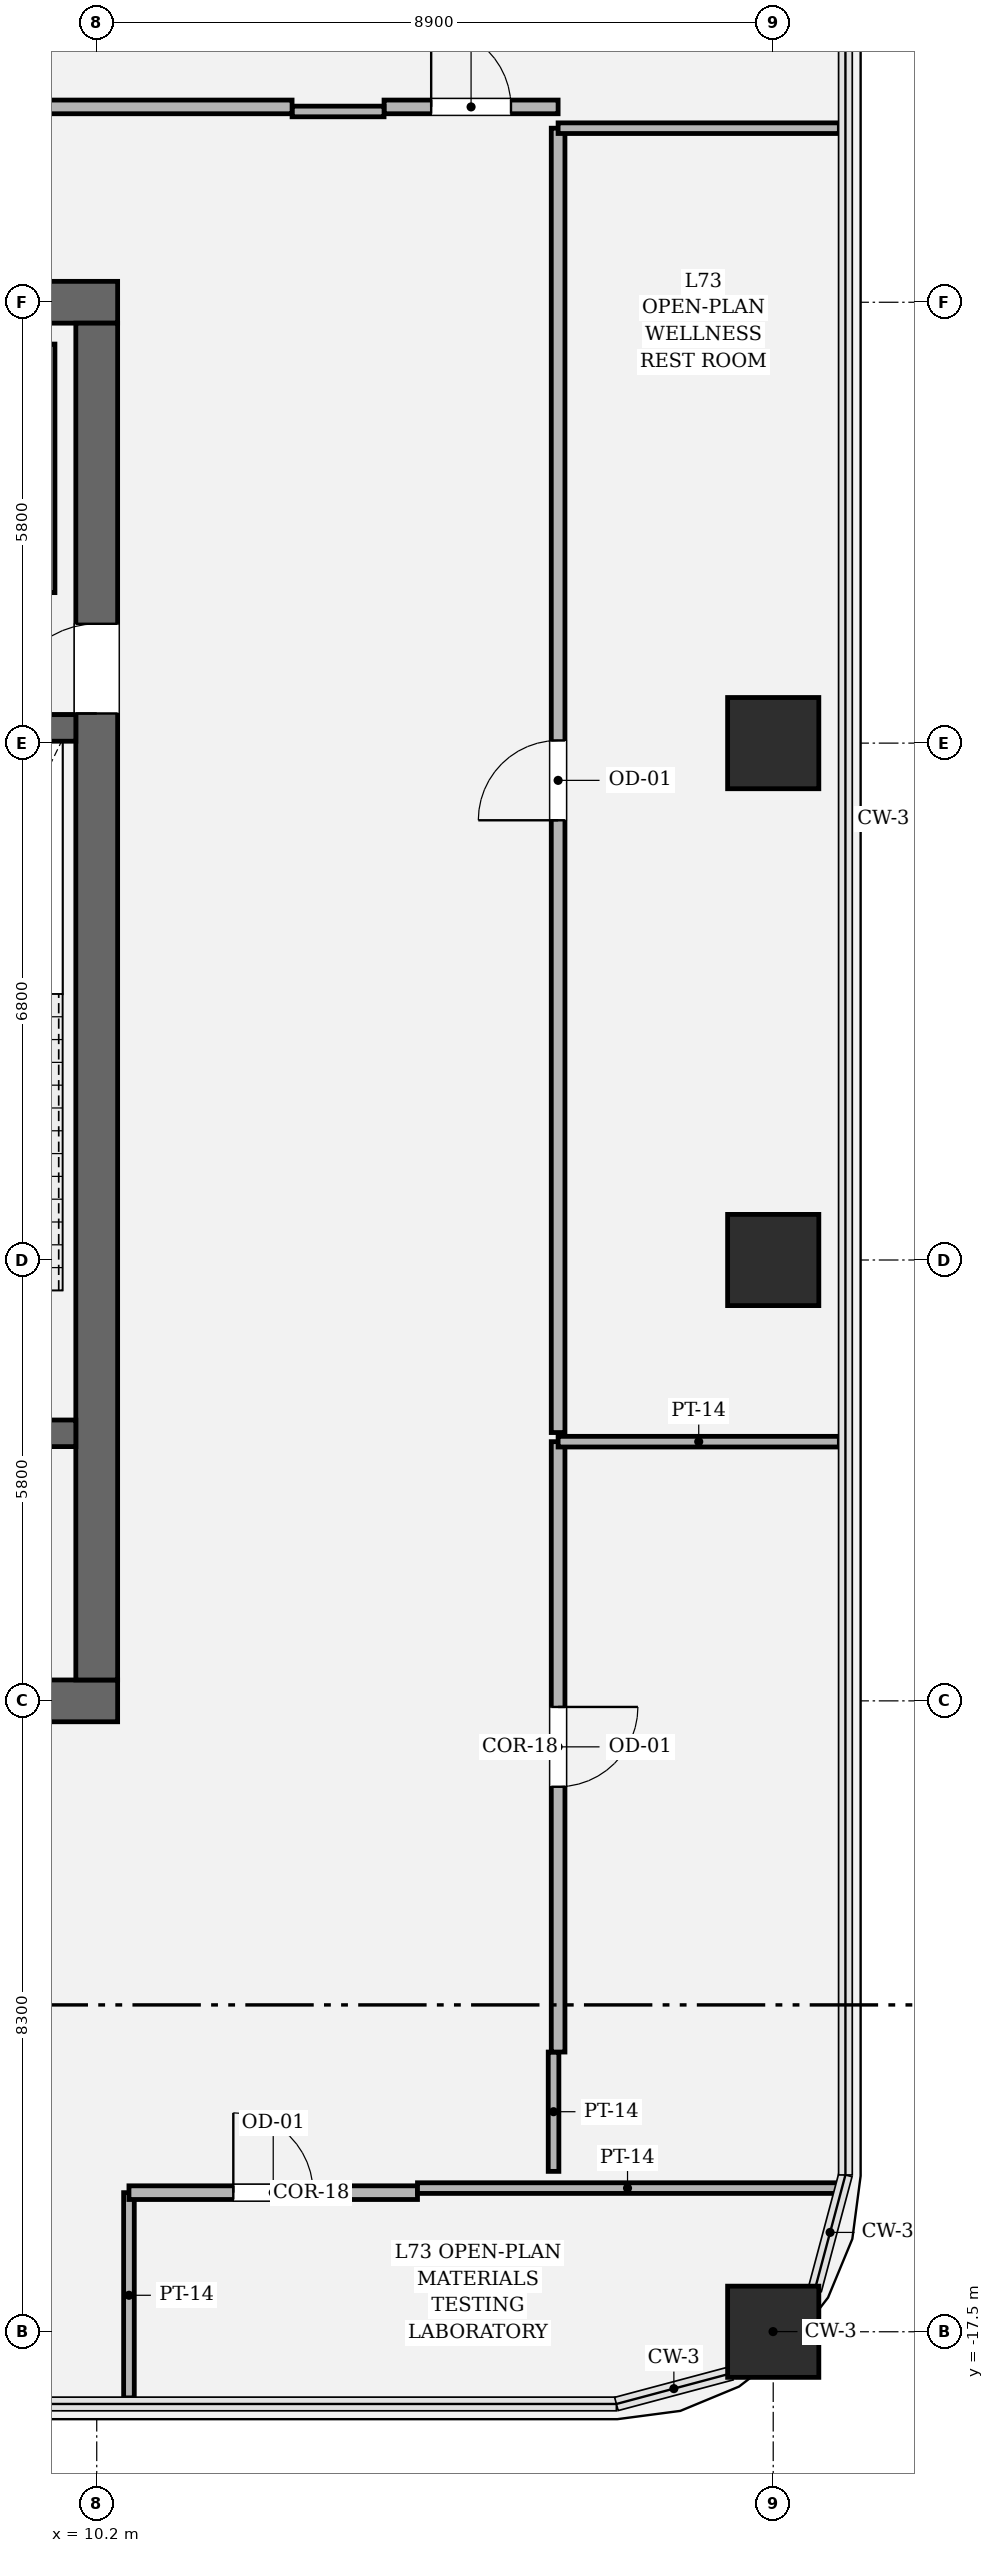
"""IFC4 building model, lengths in metres.
Left out: names, types, materials, properties, quantities, classifications, styles, units other than length and angle.
Written with IfcOpenShell. Run it as: python <this file> out.ifc"""

import sys

from ifc_helpers import new_model, si_unit, direction, frame, frame_2d, origin, origin_2d, place, context, subcontext, project, spatial, rectangle, hollow_rectangle, extrude, element, fill, save


model = new_model("IFC4")
c1 = context("Model", 3, precision=1e-05, world=origin(), true_north=direction((0.0, 1.0)))
c2 = subcontext(c1, "Body", "Model", "MODEL_VIEW")
j1 = project(units=[si_unit("LENGTHUNIT", "METRE"), si_unit("PLANEANGLEUNIT", "RADIAN")], contexts=[c1])
p1 = place(None, origin())
s1 = spatial("IfcSite", under=j1, at=p1, CompositionType="ELEMENT")
p2 = place(p1, origin())
s2 = spatial("IfcBuilding", under=s1, at=p2, CompositionType="ELEMENT")
p3 = place(p2, frame((0.0, 0.0, 309.0)))
s3 = spatial("IfcBuildingStorey", under=s2, at=p3, CompositionType="ELEMENT", Elevation=309.0)
p4 = place(p3, frame((10.475, -9.2, 0.0), z_axis=(0.0, 0.0, 1.0), x_axis=(-1.0, 0.0, 0.0)))
e1 = element("IfcWall", 1, at=p4, inside=s3, PredefinedType="SHEAR", context=c2, shape_type="SweptSolid", body=[
    extrude(rectangle(XDim=20.95, YDim=0.55, at=frame_2d((10.475, 0.0))), origin(), (0.0, 0.0, 1.0), 4.2),
])
p5 = place(p4, frame((2.75, 0.0, 0.0)))
e2 = element("IfcOpeningElement", 2, at=p5, cuts=e1, PredefinedType="OPENING", context=c2, shape_type="SweptSolid", body=[
    extrude(rectangle(XDim=1.25, YDim=2.25, at=frame_2d((0.625, 1.125))), frame((0.0, 0.285, 0.0), z_axis=(0.0, -1.0, 0.0), x_axis=(1.0, 0.0, 0.0)), (0.0, 0.0, 1.0), 0.57),
])
p6 = place(p4, frame((16.95, 0.0, 0.0)))
e3 = element("IfcOpeningElement", 3, at=p6, cuts=e1, PredefinedType="OPENING", context=c2, shape_type="SweptSolid", body=[
    extrude(rectangle(XDim=1.25, YDim=2.25, at=frame_2d((0.625, 1.125))), frame((0.0, 0.285, 0.0), z_axis=(0.0, -1.0, 0.0), x_axis=(1.0, 0.0, 0.0)), (0.0, 0.0, 1.0), 0.57),
])
p7 = place(p3, frame((-10.475, 9.2, 0.0), z_axis=(0.0, 0.0, 1.0), x_axis=(1.0, 0.0, 0.0)))
e4 = element("IfcWall", 4, at=p7, inside=s3, PredefinedType="SHEAR", context=c2, shape_type="SweptSolid", body=[
    extrude(rectangle(XDim=20.95, YDim=0.55, at=frame_2d((10.475, 0.0))), origin(), (0.0, 0.0, 1.0), 4.2),
])
p8 = place(p3, frame((10.2, 8.925, 0.0), z_axis=(0.0, 0.0, 1.0), x_axis=(0.0, -1.0, 0.0)))
e5 = element("IfcWall", 5, at=p8, inside=s3, PredefinedType="SHEAR", context=c2, shape_type="SweptSolid", body=[
    extrude(rectangle(XDim=17.85, YDim=0.55, at=frame_2d((8.925, 0.0))), origin(), (0.0, 0.0, 1.0), 4.2),
])
p9 = place(p8, frame((3.955, 0.0, 0.0)))
e6 = element("IfcOpeningElement", 6, at=p9, cuts=e5, PredefinedType="OPENING", context=c2, shape_type="SweptSolid", body=[
    extrude(rectangle(XDim=1.18, YDim=2.2, at=frame_2d((0.59, 1.1))), frame((0.0, 0.285, 0.0), z_axis=(0.0, -1.0, 0.0), x_axis=(1.0, 0.0, 0.0)), (0.0, 0.0, 1.0), 0.57),
])
p10 = place(p3, frame((4.65, -5.68, 0.0), z_axis=(0.0, 0.0, 1.0), x_axis=(1.0, 0.0, 0.0)))
e7 = element("IfcWall", 7, at=p10, inside=s3, PredefinedType="SOLIDWALL", context=c2, shape_type="SweptSolid", body=[
    extrude(rectangle(XDim=5.275, YDim=0.35, at=frame_2d((2.638, 0.0))), origin(), (0.0, 0.0, 1.0), 4.2),
])
p11 = place(p10, frame((2.71, 0.0, 0.0)))
e8 = element("IfcOpeningElement", 8, at=p11, cuts=e7, PredefinedType="OPENING", context=c2, shape_type="SweptSolid", body=[
    extrude(rectangle(XDim=1.18, YDim=2.2, at=frame_2d((0.59, 1.1))), frame((0.0, 0.185, 0.0), z_axis=(0.0, -1.0, 0.0), x_axis=(1.0, 0.0, 0.0)), (0.0, 0.0, 1.0), 0.37),
])
p12 = place(p3, frame((4.65, 3.6, 0.0), z_axis=(0.0, 0.0, 1.0), x_axis=(1.0, 0.0, 0.0)))
e9 = element("IfcWall", 9, at=p12, inside=s3, PredefinedType="SOLIDWALL", context=c2, shape_type="SweptSolid", body=[
    extrude(rectangle(XDim=5.275, YDim=0.35, at=frame_2d((2.638, 0.0))), origin(), (0.0, 0.0, 1.0), 4.2),
])
for number, where, z_axis, x_axis in (
    (10, (19.1, -17.5, 0.0), (0.0, 0.0, 1.0), (1.0, 0.0, 0.0)),
    (11, (19.1, -3.4, 0.0), (0.0, 0.0, 1.0), (1.0, 0.0, 0.0)),
    (12, (19.1, 3.4, 0.0), (0.0, 0.0, 1.0), (1.0, 0.0, 0.0)),
):
    element("IfcColumn", number, at=place(p3, frame(where, z_axis=z_axis, x_axis=x_axis)), inside=s3, PredefinedType="COLUMN", context=c2, shape_type="SweptSolid", body=[
        extrude(hollow_rectangle(XDim=1.2, YDim=1.2, WallThickness=0.035, at=origin_2d()), origin(), (0.0, 0.0, 1.0), 4.2),
    ])
p13 = place(p3, frame((9.55, 5.38, 0.0), z_axis=(0.0, 0.0, 1.0), x_axis=(0.0, 1.0, 0.0)))
e13 = element("IfcWall", 13, at=p13, inside=s3, PredefinedType="SOLIDWALL", context=c2, shape_type="SweptSolid", body=[
    extrude(rectangle(XDim=3.27, YDim=0.2, at=frame_2d((1.635, 0.0))), origin(), (0.0, 0.0, 1.0), 4.0),
])
p14 = place(p3, frame((10.624, -18.37, 0.0), z_axis=(0.0, 0.0, 1.0), x_axis=(0.0, 1.0, 0.0)))
e14 = element("IfcWall", 14, at=p14, inside=s3, PredefinedType="PARTITIONING", context=c2, shape_type="SweptSolid", body=[
    extrude(rectangle(XDim=2.7, YDim=0.14, at=frame_2d((1.35, 0.0))), origin(), (0.0, 0.0, 1.0), 3.394),
])
p15 = place(p3, frame((10.624, -15.67, 0.0), z_axis=(0.0, 0.0, 1.0), x_axis=(1.0, 0.0, 0.0)))
e15 = element("IfcWall", 15, at=p15, inside=s3, PredefinedType="PARTITIONING", context=c2, shape_type="SweptSolid", body=[
    extrude(rectangle(XDim=3.796, YDim=0.18, at=frame_2d((1.898, 0.0))), origin(), (0.0, 0.0, 1.0), 4.0),
])
p16 = place(p15, frame((1.373, 0.0, 0.0)))
e16 = element("IfcOpeningElement", 16, at=p16, cuts=e15, PredefinedType="OPENING", context=c2, shape_type="SweptSolid", body=[
    extrude(rectangle(XDim=1.05, YDim=2.2, at=frame_2d((0.525, 1.1))), frame((0.0, 0.1, 0.0), z_axis=(0.0, -1.0, 0.0), x_axis=(1.0, 0.0, 0.0)), (0.0, 0.0, 1.0), 0.2),
])
p17 = place(p3, frame((14.42, -15.61, 0.0), z_axis=(0.0, 0.0, 1.0), x_axis=(1.0, 0.0, 0.0)))
e17 = element("IfcWall", 17, at=p17, inside=s3, PredefinedType="PARTITIONING", context=c2, shape_type="SweptSolid", body=[
    extrude(rectangle(XDim=5.527, YDim=0.14, at=frame_2d((2.763, 0.0))), origin(), (0.0, 0.0, 1.0), 3.394),
])
p18 = place(p3, frame((16.21, -15.39, 0.0), z_axis=(0.0, 0.0, 1.0), x_axis=(0.0, 1.0, 0.0)))
e18 = element("IfcWall", 18, at=p18, inside=s3, PredefinedType="PARTITIONING", context=c2, shape_type="SweptSolid", body=[
    extrude(rectangle(XDim=1.57, YDim=0.14, at=frame_2d((0.785, 0.0))), origin(), (0.0, 0.0, 1.0), 4.0),
])
p19 = place(p3, frame((16.27, -13.82, 0.0), z_axis=(0.0, 0.0, 1.0), x_axis=(0.0, 1.0, 0.0)))
e19 = element("IfcWall", 19, at=p19, inside=s3, PredefinedType="PARTITIONING", context=c2, shape_type="SweptSolid", body=[
    extrude(rectangle(XDim=8.03, YDim=0.18, at=frame_2d((4.015, 0.0))), origin(), (0.0, 0.0, 1.0), 3.394),
])
p20 = place(p19, frame((3.49, 0.0, 0.0)))
e20 = element("IfcOpeningElement", 20, at=p20, cuts=e19, PredefinedType="OPENING", context=c2, shape_type="SweptSolid", body=[
    extrude(rectangle(XDim=1.05, YDim=2.2, at=frame_2d((0.525, 1.1))), frame((0.0, 0.1, 0.0), z_axis=(0.0, -1.0, 0.0), x_axis=(1.0, 0.0, 0.0)), (0.0, 0.0, 1.0), 0.2),
])
p21 = place(p3, frame((16.27, -5.79, 0.0), z_axis=(0.0, 0.0, 1.0), x_axis=(1.0, 0.0, 0.0)))
e21 = element("IfcWall", 21, at=p21, inside=s3, PredefinedType="PARTITIONING", context=c2, shape_type="SweptSolid", body=[
    extrude(rectangle(XDim=3.7, YDim=0.14, at=frame_2d((1.85, 0.0))), origin(), (0.0, 0.0, 1.0), 3.394),
])
p22 = place(p3, frame((16.27, -5.67, 0.0), z_axis=(0.0, 0.0, 1.0), x_axis=(0.0, 1.0, 0.0)))
e22 = element("IfcWall", 22, at=p22, inside=s3, PredefinedType="PARTITIONING", context=c2, shape_type="SweptSolid", body=[
    extrude(rectangle(XDim=17.16, YDim=0.18, at=frame_2d((8.58, 0.0))), origin(), (0.0, 0.0, 1.0), 3.394),
])
p23 = place(p22, frame((8.055, 0.0, 0.0)))
e23 = element("IfcOpeningElement", 23, at=p23, cuts=e22, PredefinedType="OPENING", context=c2, shape_type="SweptSolid", body=[
    extrude(rectangle(XDim=1.05, YDim=2.2, at=frame_2d((0.525, 1.1))), frame((0.0, 0.1, 0.0), z_axis=(0.0, -1.0, 0.0), x_axis=(1.0, 0.0, 0.0)), (0.0, 0.0, 1.0), 0.2),
])
p24 = place(p3, frame((16.27, 11.49, 0.0), z_axis=(0.0, 0.0, 1.0), x_axis=(1.0, 0.0, 0.0)))
e24 = element("IfcWall", 24, at=p24, inside=s3, PredefinedType="PARTITIONING", context=c2, shape_type="SweptSolid", body=[
    extrude(rectangle(XDim=3.7, YDim=0.14, at=frame_2d((1.85, 0.0))), origin(), (0.0, 0.0, 1.0), 3.394),
])
p25 = place(p3, frame((16.27, 11.77, 0.0), z_axis=(0.0, 0.0, 1.0), x_axis=(-1.0, 0.0, 0.0)))
e25 = element("IfcWall", 25, at=p25, inside=s3, PredefinedType="PARTITIONING", context=c2, shape_type="SweptSolid", body=[
    extrude(rectangle(XDim=2.29, YDim=0.18, at=frame_2d((1.145, 0.0))), origin(), (0.0, 0.0, 1.0), 3.634),
])
p26 = place(p25, frame((0.62, 0.0, 0.0)))
e26 = element("IfcOpeningElement", 26, at=p26, cuts=e25, PredefinedType="OPENING", context=c2, shape_type="SweptSolid", body=[
    extrude(rectangle(XDim=1.05, YDim=2.2, at=frame_2d((0.525, 1.1))), frame((0.0, 0.1, 0.0), z_axis=(0.0, -1.0, 0.0), x_axis=(1.0, 0.0, 0.0)), (0.0, 0.0, 1.0), 0.2),
])
p27 = place(p3, frame((13.98, 11.71, 0.0), z_axis=(0.0, 0.0, 1.0), x_axis=(-1.0, 0.0, 0.0)))
e27 = element("IfcWall", 27, at=p27, inside=s3, PredefinedType="PARTITIONING", context=c2, shape_type="SweptSolid", body=[
    extrude(rectangle(XDim=1.21, YDim=0.14, at=frame_2d((0.605, 0.0))), origin(), (0.0, 0.0, 1.0), 4.0),
])
p28 = place(p3, frame((12.77, 11.77, 0.0), z_axis=(0.0, 0.0, 1.0), x_axis=(-1.0, 0.0, 0.0)))
e28 = element("IfcWall", 28, at=p28, inside=s3, PredefinedType="PARTITIONING", context=c2, shape_type="SweptSolid", body=[
    extrude(rectangle(XDim=15.11, YDim=0.18, at=frame_2d((7.555, 0.0))), origin(), (0.0, 0.0, 1.0), 3.394),
])
p29 = place(p9, origin())
e29 = element("IfcDoor", 29, at=p29, inside=s3, OperationType="SINGLE_SWING_RIGHT", PredefinedType="DOOR", context=c2, shape_type="SweptSolid", body=[
    extrude(rectangle(XDim=1.18, YDim=2.2, at=frame_2d((0.59, 1.1))), frame((0.0, 0.025, 0.0), z_axis=(0.0, -1.0, 0.0), x_axis=(1.0, 0.0, 0.0)), (0.0, 0.0, 1.0), 0.05),
])
fill(e6, e29)
p30 = place(p16, origin())
e30 = element("IfcDoor", 30, at=p30, inside=s3, OperationType="SINGLE_SWING_LEFT", PredefinedType="DOOR", context=c2, shape_type="SweptSolid", body=[
    extrude(rectangle(XDim=1.05, YDim=2.2, at=frame_2d((0.525, 1.1))), frame((0.0, 0.025, 0.0), z_axis=(0.0, -1.0, 0.0), x_axis=(1.0, 0.0, 0.0)), (0.0, 0.0, 1.0), 0.05),
])
fill(e16, e30)
p31 = place(p20, origin())
e31 = element("IfcDoor", 31, at=p31, inside=s3, OperationType="SINGLE_SWING_RIGHT", PredefinedType="DOOR", context=c2, shape_type="SweptSolid", body=[
    extrude(rectangle(XDim=1.05, YDim=2.2, at=frame_2d((0.525, 1.1))), frame((0.0, 0.025, 0.0), z_axis=(0.0, -1.0, 0.0), x_axis=(1.0, 0.0, 0.0)), (0.0, 0.0, 1.0), 0.05),
])
fill(e20, e31)
p32 = place(p23, origin())
e32 = element("IfcDoor", 32, at=p32, inside=s3, OperationType="SINGLE_SWING_LEFT", PredefinedType="DOOR", context=c2, shape_type="SweptSolid", body=[
    extrude(rectangle(XDim=1.05, YDim=2.2, at=frame_2d((0.525, 1.1))), frame((0.0, 0.025, 0.0), z_axis=(0.0, -1.0, 0.0), x_axis=(1.0, 0.0, 0.0)), (0.0, 0.0, 1.0), 0.05),
])
fill(e23, e32)
p33 = place(p26, origin())
e33 = element("IfcDoor", 33, at=p33, inside=s3, OperationType="SINGLE_SWING_RIGHT", PredefinedType="DOOR", context=c2, shape_type="SweptSolid", body=[
    extrude(rectangle(XDim=1.05, YDim=2.2, at=frame_2d((0.525, 1.1))), frame((0.0, 0.025, 0.0), z_axis=(0.0, -1.0, 0.0), x_axis=(1.0, 0.0, 0.0)), (0.0, 0.0, 1.0), 0.05),
])
fill(e26, e33)
save(model, sys.argv[1])
